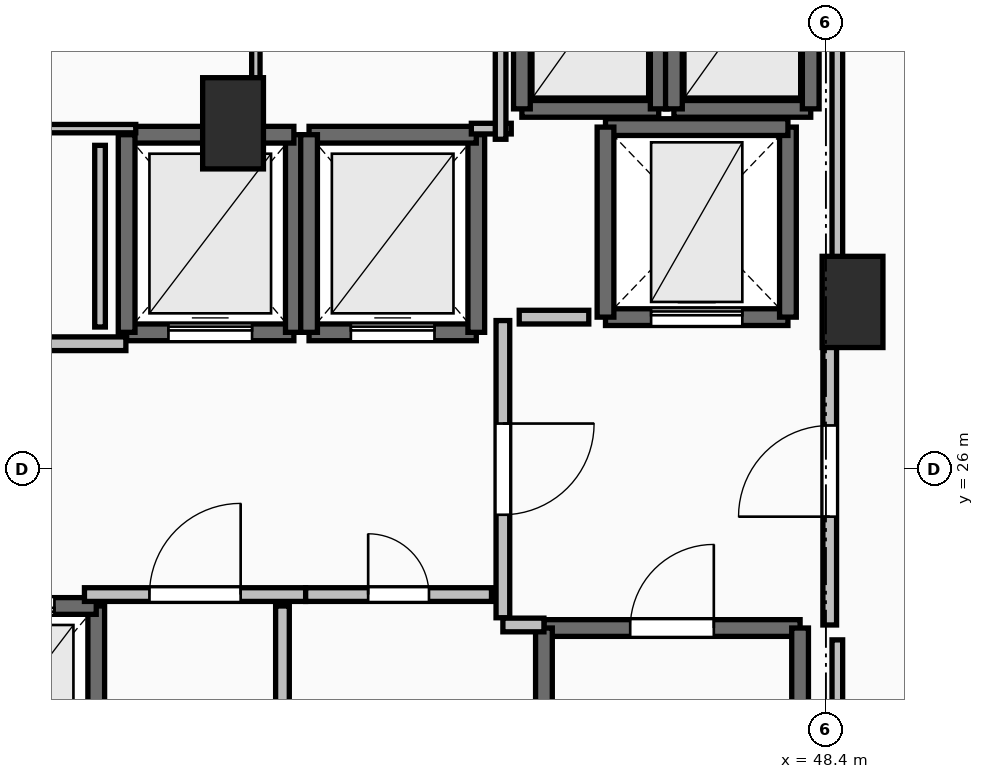
"""IFC4 building model, lengths in metres.
Left out: names, types, materials, properties, quantities, classifications, styles, units other than length and angle.
Written with IfcOpenShell. Run it as: python <this file> out.ifc"""

import sys

from ifc_helpers import new_model, si_unit, direction, frame, frame_2d, origin, origin_2d, place, context, subcontext, project, spatial, rectangle, extrude, element, fill, save


model = new_model("IFC4")
c1 = context("Model", 3, precision=1e-05, world=origin(), true_north=direction((0.0, 1.0)))
c2 = subcontext(c1, "Body", "Model", "MODEL_VIEW")
j1 = project(units=[si_unit("LENGTHUNIT", "METRE"), si_unit("PLANEANGLEUNIT", "RADIAN")], contexts=[c1])
p1 = place(None, origin())
s1 = spatial("IfcSite", under=j1, at=p1, CompositionType="ELEMENT")
p2 = place(p1, origin())
s2 = spatial("IfcBuilding", under=s1, at=p2, CompositionType="ELEMENT")
p3 = place(p2, frame((0.0, 0.0, 174.6)))
s3 = spatial("IfcBuildingStorey", under=s2, at=p3, CompositionType="ELEMENT", Elevation=174.6)
for number, where, z_axis, x_axis in (
    (1, (48.75, 28.2, 0.0), (0.0, 0.0, 1.0), (1.0, 0.0, 0.0)),
    (2, (40.6, 30.55, 0.0), (0.0, 0.0, 1.0), (1.0, 0.0, 0.0)),
):
    element("IfcColumn", number, at=place(p3, frame(where, z_axis=z_axis, x_axis=x_axis)), inside=s3, PredefinedType="PILASTER", context=c2, shape_type="SweptSolid", body=[
        extrude(rectangle(XDim=0.8, YDim=1.2, at=origin_2d()), origin(), (0.0, 0.0, 1.0), 4.5),
    ])
p4 = place(p3, frame((44.69, 23.91, 0.0), z_axis=(0.0, 0.0, 1.0), x_axis=(1.0, 0.0, 0.0)))
e3 = element("IfcWall", 3, at=p4, inside=s3, PredefinedType="SOLIDWALL", context=c2, shape_type="SweptSolid", body=[
    extrude(rectangle(XDim=3.37, YDim=0.22, at=frame_2d((1.685, 0.0))), origin(), (0.0, 0.0, 1.0), 4.24),
])
p5 = place(p4, frame((1.135, 0.0, 0.0)))
e4 = element("IfcOpeningElement", 4, at=p5, cuts=e3, PredefinedType="OPENING", context=c2, shape_type="SweptSolid", body=[
    extrude(rectangle(XDim=1.1, YDim=2.15, at=frame_2d((0.55, 1.075))), frame((0.0, 0.125, 0.0), z_axis=(0.0, -1.0, 0.0), x_axis=(1.0, 0.0, 0.0)), (0.0, 0.0, 1.0), 0.25),
])
for number, where, z_axis, x_axis in (
    (5, (48.06, 23.91, 0.0), (0.0, 0.0, 1.0), (0.0, -1.0, 0.0)),
    (6, (44.69, 16.49, 0.0), (0.0, 0.0, 1.0), (0.0, 1.0, 0.0)),
):
    element("IfcWall", number, at=place(p3, frame(where, z_axis=z_axis, x_axis=x_axis)), inside=s3, PredefinedType="SOLIDWALL", context=c2, shape_type="SweptSolid", body=[
        extrude(rectangle(XDim=7.42, YDim=0.22, at=frame_2d((3.71, 0.0))), origin(), (0.0, 0.0, 1.0), 4.24),
    ])
p6 = place(p3, frame((38.8, 21.6, 0.0), z_axis=(0.0, 0.0, 1.0), x_axis=(0.0, 1.0, 0.0)))
e7 = element("IfcWall", 7, at=p6, inside=s3, PredefinedType="SOLIDWALL", context=c2, shape_type="SweptSolid", body=[
    extrude(rectangle(XDim=2.6, YDim=0.22, at=frame_2d((1.3, 0.0))), origin(), (0.0, 0.0, 1.0), 4.24),
])
p7 = place(p3, frame((38.8, 24.2, 0.0), z_axis=(0.0, 0.0, 1.0), x_axis=(-1.0, 0.0, 0.0)))
e8 = element("IfcWall", 8, at=p7, inside=s3, PredefinedType="SOLIDWALL", context=c2, shape_type="SweptSolid", body=[
    extrude(rectangle(XDim=2.2, YDim=0.22, at=frame_2d((1.1, 0.0))), origin(), (0.0, 0.0, 1.0), 4.24),
])
p8 = place(p7, frame((0.55, 0.0, 0.0)))
e9 = element("IfcOpeningElement", 9, at=p8, cuts=e8, PredefinedType="OPENING", context=c2, shape_type="SweptSolid", body=[
    extrude(rectangle(XDim=1.1, YDim=2.2, at=frame_2d((0.55, 1.1))), frame((0.0, 0.125, 0.0), z_axis=(0.0, -1.0, 0.0), x_axis=(1.0, 0.0, 0.0)), (0.0, 0.0, 1.0), 0.25),
])
p9 = place(p3, frame((39.2, 27.8, 0.0), z_axis=(0.0, 0.0, 1.0), x_axis=(1.0, 0.0, 0.0)))
e10 = element("IfcWall", 10, at=p9, inside=s3, PredefinedType="SOLIDWALL", context=c2, shape_type="SweptSolid", body=[
    extrude(rectangle(XDim=2.2, YDim=0.22, at=frame_2d((1.1, 0.0))), origin(), (0.0, 0.0, 1.0), 4.24),
])
p10 = place(p9, frame((0.55, 0.0, 0.0)))
e11 = element("IfcOpeningElement", 11, at=p10, cuts=e10, PredefinedType="OPENING", context=c2, shape_type="SweptSolid", body=[
    extrude(rectangle(XDim=1.1, YDim=2.2, at=frame_2d((0.55, 1.1))), frame((0.0, 0.125, 0.0), z_axis=(0.0, -1.0, 0.0), x_axis=(1.0, 0.0, 0.0)), (0.0, 0.0, 1.0), 0.25),
])
p11 = place(p3, frame((41.4, 27.8, 0.0), z_axis=(0.0, 0.0, 1.0), x_axis=(0.0, 1.0, 0.0)))
e12 = element("IfcWall", 12, at=p11, inside=s3, PredefinedType="SOLIDWALL", context=c2, shape_type="SweptSolid", body=[
    extrude(rectangle(XDim=2.6, YDim=0.22, at=frame_2d((1.3, 0.0))), origin(), (0.0, 0.0, 1.0), 4.24),
])
p12 = place(p3, frame((41.4, 30.4, 0.0), z_axis=(0.0, 0.0, 1.0), x_axis=(-1.0, 0.0, 0.0)))
e13 = element("IfcWall", 13, at=p12, inside=s3, PredefinedType="SOLIDWALL", context=c2, shape_type="SweptSolid", body=[
    extrude(rectangle(XDim=2.2, YDim=0.22, at=frame_2d((1.1, 0.0))), origin(), (0.0, 0.0, 1.0), 4.24),
])
p13 = place(p3, frame((39.2, 30.4, 0.0), z_axis=(0.0, 0.0, 1.0), x_axis=(0.0, -1.0, 0.0)))
e14 = element("IfcWall", 14, at=p13, inside=s3, PredefinedType="SOLIDWALL", context=c2, shape_type="SweptSolid", body=[
    extrude(rectangle(XDim=2.6, YDim=0.22, at=frame_2d((1.3, 0.0))), origin(), (0.0, 0.0, 1.0), 4.24),
])
p14 = place(p3, frame((41.6, 27.8, 0.0), z_axis=(0.0, 0.0, 1.0), x_axis=(1.0, 0.0, 0.0)))
e15 = element("IfcWall", 15, at=p14, inside=s3, PredefinedType="SOLIDWALL", context=c2, shape_type="SweptSolid", body=[
    extrude(rectangle(XDim=2.2, YDim=0.22, at=frame_2d((1.1, 0.0))), origin(), (0.0, 0.0, 1.0), 4.24),
])
p15 = place(p14, frame((0.55, 0.0, 0.0)))
e16 = element("IfcOpeningElement", 16, at=p15, cuts=e15, PredefinedType="OPENING", context=c2, shape_type="SweptSolid", body=[
    extrude(rectangle(XDim=1.1, YDim=2.2, at=frame_2d((0.55, 1.1))), frame((0.0, 0.125, 0.0), z_axis=(0.0, -1.0, 0.0), x_axis=(1.0, 0.0, 0.0)), (0.0, 0.0, 1.0), 0.25),
])
p16 = place(p3, frame((43.8, 27.8, 0.0), z_axis=(0.0, 0.0, 1.0), x_axis=(0.0, 1.0, 0.0)))
e17 = element("IfcWall", 17, at=p16, inside=s3, PredefinedType="SOLIDWALL", context=c2, shape_type="SweptSolid", body=[
    extrude(rectangle(XDim=2.6, YDim=0.22, at=frame_2d((1.3, 0.0))), origin(), (0.0, 0.0, 1.0), 4.24),
])
p17 = place(p3, frame((43.8, 30.4, 0.0), z_axis=(0.0, 0.0, 1.0), x_axis=(-1.0, 0.0, 0.0)))
e18 = element("IfcWall", 18, at=p17, inside=s3, PredefinedType="SOLIDWALL", context=c2, shape_type="SweptSolid", body=[
    extrude(rectangle(XDim=2.2, YDim=0.22, at=frame_2d((1.1, 0.0))), origin(), (0.0, 0.0, 1.0), 4.24),
])
p18 = place(p3, frame((41.6, 30.4, 0.0), z_axis=(0.0, 0.0, 1.0), x_axis=(0.0, -1.0, 0.0)))
e19 = element("IfcWall", 19, at=p18, inside=s3, PredefinedType="SOLIDWALL", context=c2, shape_type="SweptSolid", body=[
    extrude(rectangle(XDim=2.6, YDim=0.22, at=frame_2d((1.3, 0.0))), origin(), (0.0, 0.0, 1.0), 4.24),
])
p19 = place(p3, frame((44.4, 30.74, 0.0), z_axis=(0.0, 0.0, 1.0), x_axis=(1.0, 0.0, 0.0)))
e20 = element("IfcWall", 20, at=p19, inside=s3, PredefinedType="SOLIDWALL", context=c2, shape_type="SweptSolid", body=[
    extrude(rectangle(XDim=1.8, YDim=0.22, at=frame_2d((0.9, 0.0))), origin(), (0.0, 0.0, 1.0), 4.24),
])
for number, where, z_axis, x_axis in (
    (21, (46.2, 30.74, 0.0), (0.0, 0.0, 1.0), (0.0, 1.0, 0.0)),
    (22, (44.4, 33.16, 0.0), (0.0, 0.0, 1.0), (0.0, -1.0, 0.0)),
):
    element("IfcWall", number, at=place(p3, frame(where, z_axis=z_axis, x_axis=x_axis)), inside=s3, PredefinedType="SOLIDWALL", context=c2, shape_type="SweptSolid", body=[
        extrude(rectangle(XDim=2.42, YDim=0.22, at=frame_2d((1.21, 0.0))), origin(), (0.0, 0.0, 1.0), 4.24),
    ])
p20 = place(p3, frame((46.4, 30.74, 0.0), z_axis=(0.0, 0.0, 1.0), x_axis=(1.0, 0.0, 0.0)))
e23 = element("IfcWall", 23, at=p20, inside=s3, PredefinedType="SOLIDWALL", context=c2, shape_type="SweptSolid", body=[
    extrude(rectangle(XDim=1.8, YDim=0.22, at=frame_2d((0.9, 0.0))), origin(), (0.0, 0.0, 1.0), 4.24),
])
for number, where, z_axis, x_axis in (
    (24, (48.2, 30.74, 0.0), (0.0, 0.0, 1.0), (0.0, 1.0, 0.0)),
    (25, (46.4, 33.16, 0.0), (0.0, 0.0, 1.0), (0.0, -1.0, 0.0)),
):
    element("IfcWall", number, at=place(p3, frame(where, z_axis=z_axis, x_axis=x_axis)), inside=s3, PredefinedType="SOLIDWALL", context=c2, shape_type="SweptSolid", body=[
        extrude(rectangle(XDim=2.42, YDim=0.22, at=frame_2d((1.21, 0.0))), origin(), (0.0, 0.0, 1.0), 4.24),
    ])
p21 = place(p3, frame((45.5, 28.0, 0.0), z_axis=(0.0, 0.0, 1.0), x_axis=(1.0, 0.0, 0.0)))
e26 = element("IfcWall", 26, at=p21, inside=s3, PredefinedType="SHEAR", context=c2, shape_type="SweptSolid", body=[
    extrude(rectangle(XDim=2.4, YDim=0.22, at=frame_2d((1.2, 0.0))), origin(), (0.0, 0.0, 1.0), 4.24),
])
p22 = place(p21, frame((0.6, 0.0, 0.0)))
e27 = element("IfcOpeningElement", 27, at=p22, cuts=e26, PredefinedType="OPENING", context=c2, shape_type="SweptSolid", body=[
    extrude(rectangle(XDim=1.2, YDim=2.2, at=frame_2d((0.6, 1.1))), frame((0.0, 0.125, 0.0), z_axis=(0.0, -1.0, 0.0), x_axis=(1.0, 0.0, 0.0)), (0.0, 0.0, 1.0), 0.25),
])
p23 = place(p3, frame((47.9, 28.0, 0.0), z_axis=(0.0, 0.0, 1.0), x_axis=(0.0, 1.0, 0.0)))
e28 = element("IfcWall", 28, at=p23, inside=s3, PredefinedType="SHEAR", context=c2, shape_type="SweptSolid", body=[
    extrude(rectangle(XDim=2.5, YDim=0.22, at=frame_2d((1.25, 0.0))), origin(), (0.0, 0.0, 1.0), 4.24),
])
p24 = place(p3, frame((47.9, 30.5, 0.0), z_axis=(0.0, 0.0, 1.0), x_axis=(-1.0, 0.0, 0.0)))
e29 = element("IfcWall", 29, at=p24, inside=s3, PredefinedType="SHEAR", context=c2, shape_type="SweptSolid", body=[
    extrude(rectangle(XDim=2.4, YDim=0.22, at=frame_2d((1.2, 0.0))), origin(), (0.0, 0.0, 1.0), 4.24),
])
p25 = place(p3, frame((45.5, 30.5, 0.0), z_axis=(0.0, 0.0, 1.0), x_axis=(0.0, -1.0, 0.0)))
e30 = element("IfcWall", 30, at=p25, inside=s3, PredefinedType="SHEAR", context=c2, shape_type="SweptSolid", body=[
    extrude(rectangle(XDim=2.5, YDim=0.22, at=frame_2d((1.25, 0.0))), origin(), (0.0, 0.0, 1.0), 4.24),
])
p26 = place(p3, frame((44.15, 27.955, 0.0), z_axis=(0.0, 0.0, 1.0), x_axis=(0.0, -1.0, 0.0)))
e31 = element("IfcWall", 31, at=p26, inside=s3, PredefinedType="PARTITIONING", context=c2, shape_type="SweptSolid", body=[
    extrude(rectangle(XDim=3.91, YDim=0.18, at=frame_2d((1.955, 0.0))), origin(), (0.0, 0.0, 1.0), 4.24),
])
p27 = place(p26, frame((1.355, 0.0, 0.0)))
e32 = element("IfcOpeningElement", 32, at=p27, cuts=e31, PredefinedType="OPENING", context=c2, shape_type="SweptSolid", body=[
    extrude(rectangle(XDim=1.2, YDim=2.15, at=frame_2d((0.6, 1.075))), frame((0.0, 0.105, 0.0), z_axis=(0.0, -1.0, 0.0), x_axis=(1.0, 0.0, 0.0)), (0.0, 0.0, 1.0), 0.21),
])
p28 = place(p3, frame((44.15, 23.95, 0.0), z_axis=(0.0, 0.0, 1.0), x_axis=(1.0, 0.0, 0.0)))
e33 = element("IfcWall", 33, at=p28, inside=s3, PredefinedType="PARTITIONING", context=c2, shape_type="SweptSolid", body=[
    extrude(rectangle(XDim=0.54, YDim=0.18, at=frame_2d((0.27, 0.0))), origin(), (0.0, 0.0, 1.0), 4.24),
])
p29 = place(p3, frame((48.45, 23.95, 0.0), z_axis=(0.0, 0.0, 1.0), x_axis=(0.0, 1.0, 0.0)))
e34 = element("IfcWall", 34, at=p29, inside=s3, PredefinedType="PARTITIONING", context=c2, shape_type="SweptSolid", body=[
    extrude(rectangle(XDim=4.05, YDim=0.18, at=frame_2d((2.025, 0.0))), origin(), (0.0, 0.0, 1.0), 4.24),
])
p30 = place(p29, frame((1.425, 0.0, 0.0)))
e35 = element("IfcOpeningElement", 35, at=p30, cuts=e34, PredefinedType="OPENING", context=c2, shape_type="SweptSolid", body=[
    extrude(rectangle(XDim=1.2, YDim=2.15, at=frame_2d((0.6, 1.075))), frame((0.0, 0.105, 0.0), z_axis=(0.0, -1.0, 0.0), x_axis=(1.0, 0.0, 0.0)), (0.0, 0.0, 1.0), 0.21),
])
p31 = place(p3, frame((38.645, 24.35, 0.0), z_axis=(0.0, 0.0, 1.0), x_axis=(1.0, 0.0, 0.0)))
e36 = element("IfcWall", 36, at=p31, inside=s3, PredefinedType="PARTITIONING", context=c2, shape_type="SweptSolid", body=[
    extrude(rectangle(XDim=2.91, YDim=0.18, at=frame_2d((1.455, 0.0))), origin(), (0.0, 0.0, 1.0), 4.24),
])
p32 = place(p31, frame((0.855, 0.0, 0.0)))
e37 = element("IfcOpeningElement", 37, at=p32, cuts=e36, PredefinedType="OPENING", context=c2, shape_type="SweptSolid", body=[
    extrude(rectangle(XDim=1.2, YDim=2.15, at=frame_2d((0.6, 1.075))), frame((0.0, 0.105, 0.0), z_axis=(0.0, -1.0, 0.0), x_axis=(1.0, 0.0, 0.0)), (0.0, 0.0, 1.0), 0.21),
])
p33 = place(p3, frame((41.555, 24.35, 0.0), z_axis=(0.0, 0.0, 1.0), x_axis=(1.0, 0.0, 0.0)))
e38 = element("IfcWall", 38, at=p33, inside=s3, PredefinedType="PARTITIONING", context=c2, shape_type="SweptSolid", body=[
    extrude(rectangle(XDim=2.445, YDim=0.18, at=frame_2d((1.223, 0.0))), origin(), (0.0, 0.0, 1.0), 4.24),
])
p34 = place(p33, frame((0.823, 0.0, 0.0)))
e39 = element("IfcOpeningElement", 39, at=p34, cuts=e38, PredefinedType="OPENING", context=c2, shape_type="SweptSolid", body=[
    extrude(rectangle(XDim=0.8, YDim=2.05, at=frame_2d((0.4, 1.025))), frame((0.0, 0.105, 0.0), z_axis=(0.0, -1.0, 0.0), x_axis=(1.0, 0.0, 0.0)), (0.0, 0.0, 1.0), 0.21),
])
p35 = place(p3, frame((39.19, 27.65, 0.0), z_axis=(0.0, 0.0, 1.0), x_axis=(-1.0, 0.0, 0.0)))
e40 = element("IfcWall", 40, at=p35, inside=s3, PredefinedType="PARTITIONING", context=c2, shape_type="SweptSolid", body=[
    extrude(rectangle(XDim=3.38, YDim=0.18, at=frame_2d((1.69, 0.0))), origin(), (0.0, 0.0, 1.0), 4.24),
])
p36 = place(p35, frame((1.265, 0.0, 0.0)))
e41 = element("IfcOpeningElement", 41, at=p36, cuts=e40, PredefinedType="OPENING", context=c2, shape_type="SweptSolid", body=[
    extrude(rectangle(XDim=0.85, YDim=2.1, at=frame_2d((0.425, 1.05))), frame((0.0, 0.105, 0.0), z_axis=(0.0, -1.0, 0.0), x_axis=(1.0, 0.0, 0.0)), (0.0, 0.0, 1.0), 0.21),
])
p37 = place(p3, frame((41.25, 16.32, 0.0), z_axis=(0.0, 0.0, 1.0), x_axis=(0.0, 1.0, 0.0)))
e42 = element("IfcWall", 42, at=p37, inside=s3, PredefinedType="PARTITIONING", context=c2, shape_type="SweptSolid", body=[
    extrude(rectangle(XDim=7.88, YDim=0.18, at=frame_2d((3.94, 0.0))), origin(), (0.0, 0.0, 1.0), 4.24),
])
p38 = place(p37, frame((3.54, 0.0, 0.0)))
e43 = element("IfcOpeningElement", 43, at=p38, cuts=e42, PredefinedType="OPENING", context=c2, shape_type="SweptSolid", body=[
    extrude(rectangle(XDim=0.8, YDim=2.05, at=frame_2d((0.4, 1.025))), frame((0.0, 0.105, 0.0), z_axis=(0.0, -1.0, 0.0), x_axis=(1.0, 0.0, 0.0)), (0.0, 0.0, 1.0), 0.21),
])
p39 = place(p3, frame((40.9, 30.34, 0.0), z_axis=(0.0, 0.0, 1.0), x_axis=(0.0, 1.0, 0.0)))
e44 = element("IfcWall", 44, at=p39, inside=s3, PredefinedType="PARTITIONING", context=c2, shape_type="SweptSolid", body=[
    extrude(rectangle(XDim=3.56, YDim=0.11, at=frame_2d((1.78, 0.0))), origin(), (0.0, 0.0, 1.0), 4.24),
])
p40 = place(p3, frame((36.11, 30.48, 0.0), z_axis=(0.0, 0.0, 1.0), x_axis=(1.0, 0.0, 0.0)))
e45 = element("IfcWall", 45, at=p40, inside=s3, PredefinedType="PARTITIONING", context=c2, shape_type="SweptSolid", body=[
    extrude(rectangle(XDim=3.21, YDim=0.11, at=frame_2d((1.605, 0.0))), origin(), (0.0, 0.0, 1.0), 3.432),
])
p41 = place(p3, frame((45.28, 28.0, 0.0), z_axis=(0.0, 0.0, 1.0), x_axis=(-1.0, 0.0, 0.0)))
e46 = element("IfcWall", 46, at=p41, inside=s3, PredefinedType="PARTITIONING", context=c2, shape_type="SweptSolid", body=[
    extrude(rectangle(XDim=0.915, YDim=0.18, at=frame_2d((0.458, 0.0))), origin(), (0.0, 0.0, 1.0), 4.24),
])
p42 = place(p3, frame((43.735, 30.48, 0.0), z_axis=(0.0, 0.0, 1.0), x_axis=(1.0, 0.0, 0.0)))
e47 = element("IfcWall", 47, at=p42, inside=s3, PredefinedType="PARTITIONING", context=c2, shape_type="SweptSolid", body=[
    extrude(rectangle(XDim=0.525, YDim=0.14, at=frame_2d((0.262, 0.0))), origin(), (0.0, 0.0, 1.0), 4.24),
])
p43 = place(p3, frame((44.12, 30.34, 0.0), z_axis=(0.0, 0.0, 1.0), x_axis=(0.0, 1.0, 0.0)))
e48 = element("IfcWall", 48, at=p43, inside=s3, PredefinedType="PARTITIONING", context=c2, shape_type="SweptSolid", body=[
    extrude(rectangle(XDim=2.66, YDim=0.14, at=frame_2d((1.33, 0.0))), origin(), (0.0, 0.0, 1.0), 4.24),
])
p44 = place(p3, frame((38.85, 27.87, 0.0), z_axis=(0.0, 0.0, 1.0), x_axis=(0.0, 1.0, 0.0)))
e49 = element("IfcWall", 49, at=p44, inside=s3, PredefinedType="PARTITIONING", context=c2, shape_type="SweptSolid", body=[
    extrude(rectangle(XDim=2.39, YDim=0.14, at=frame_2d((1.195, 0.0))), origin(), (0.0, 0.0, 1.0), 4.24),
])
p45 = place(p3, frame((48.55, 16.24, 0.0), z_axis=(0.0, 0.0, 1.0), x_axis=(0.0, 1.0, 0.0)))
e50 = element("IfcWall", 50, at=p45, inside=s3, PredefinedType="PARTITIONING", context=c2, shape_type="SweptSolid", body=[
    extrude(rectangle(XDim=7.514, YDim=0.14, at=frame_2d((3.757, 0.0))), origin(), (0.0, 0.0, 1.0), 3.432),
])
p46 = place(p3, frame((48.55, 28.196, 0.0), z_axis=(0.0, 0.0, 1.0), x_axis=(0.0, 1.0, 0.0)))
e51 = element("IfcWall", 51, at=p46, inside=s3, PredefinedType="PARTITIONING", context=c2, shape_type="SweptSolid", body=[
    extrude(rectangle(XDim=5.254, YDim=0.14, at=frame_2d((2.627, 0.0))), origin(), (0.0, 0.0, 1.0), 3.432),
])
p47 = place(p5, origin())
e52 = element("IfcDoor", 52, at=p47, inside=s3, OperationType="SINGLE_SWING_RIGHT", PredefinedType="DOOR", context=c2, shape_type="SweptSolid", body=[
    extrude(rectangle(XDim=1.1, YDim=2.15, at=frame_2d((0.55, 1.075))), frame((0.0, 0.025, 0.0), z_axis=(0.0, -1.0, 0.0), x_axis=(1.0, 0.0, 0.0)), (0.0, 0.0, 1.0), 0.05),
])
fill(e4, e52)
p48 = place(p8, origin())
e53 = element("IfcDoor", 53, at=p48, inside=s3, OperationType="SLIDING_TO_LEFT", PredefinedType="DOOR", context=c2, shape_type="SweptSolid", body=[
    extrude(rectangle(XDim=1.1, YDim=2.2, at=frame_2d((0.55, 1.1))), frame((0.0, 0.025, 0.0), z_axis=(0.0, -1.0, 0.0), x_axis=(1.0, 0.0, 0.0)), (0.0, 0.0, 1.0), 0.05),
])
fill(e9, e53)
p49 = place(p10, origin())
e54 = element("IfcDoor", 54, at=p49, inside=s3, OperationType="SLIDING_TO_LEFT", PredefinedType="DOOR", context=c2, shape_type="SweptSolid", body=[
    extrude(rectangle(XDim=1.1, YDim=2.2, at=frame_2d((0.55, 1.1))), frame((0.0, 0.025, 0.0), z_axis=(0.0, -1.0, 0.0), x_axis=(1.0, 0.0, 0.0)), (0.0, 0.0, 1.0), 0.05),
])
fill(e11, e54)
p50 = place(p15, origin())
e55 = element("IfcDoor", 55, at=p50, inside=s3, OperationType="SLIDING_TO_LEFT", PredefinedType="DOOR", context=c2, shape_type="SweptSolid", body=[
    extrude(rectangle(XDim=1.1, YDim=2.2, at=frame_2d((0.55, 1.1))), frame((0.0, 0.025, 0.0), z_axis=(0.0, -1.0, 0.0), x_axis=(1.0, 0.0, 0.0)), (0.0, 0.0, 1.0), 0.05),
])
fill(e16, e55)
p51 = place(p22, origin())
e56 = element("IfcDoor", 56, at=p51, inside=s3, OperationType="SLIDING_TO_LEFT", PredefinedType="DOOR", context=c2, shape_type="SweptSolid", body=[
    extrude(rectangle(XDim=1.2, YDim=2.2, at=frame_2d((0.6, 1.1))), frame((0.0, 0.025, 0.0), z_axis=(0.0, -1.0, 0.0), x_axis=(1.0, 0.0, 0.0)), (0.0, 0.0, 1.0), 0.05),
])
fill(e27, e56)
p52 = place(p27, origin())
e57 = element("IfcDoor", 57, at=p52, inside=s3, OperationType="SINGLE_SWING_LEFT", PredefinedType="DOOR", context=c2, shape_type="SweptSolid", body=[
    extrude(rectangle(XDim=1.2, YDim=2.15, at=frame_2d((0.6, 1.075))), frame((0.0, 0.025, 0.0), z_axis=(0.0, -1.0, 0.0), x_axis=(1.0, 0.0, 0.0)), (0.0, 0.0, 1.0), 0.05),
])
fill(e32, e57)
p53 = place(p30, origin())
e58 = element("IfcDoor", 58, at=p53, inside=s3, OperationType="SINGLE_SWING_LEFT", PredefinedType="DOOR", context=c2, shape_type="SweptSolid", body=[
    extrude(rectangle(XDim=1.2, YDim=2.15, at=frame_2d((0.6, 1.075))), frame((0.0, 0.025, 0.0), z_axis=(0.0, -1.0, 0.0), x_axis=(1.0, 0.0, 0.0)), (0.0, 0.0, 1.0), 0.05),
])
fill(e35, e58)
p54 = place(p32, origin())
e59 = element("IfcDoor", 59, at=p54, inside=s3, OperationType="SINGLE_SWING_RIGHT", PredefinedType="DOOR", context=c2, shape_type="SweptSolid", body=[
    extrude(rectangle(XDim=1.2, YDim=2.15, at=frame_2d((0.6, 1.075))), frame((0.0, 0.025, 0.0), z_axis=(0.0, -1.0, 0.0), x_axis=(1.0, 0.0, 0.0)), (0.0, 0.0, 1.0), 0.05),
])
fill(e37, e59)
p55 = place(p34, origin())
e60 = element("IfcDoor", 60, at=p55, inside=s3, OperationType="SINGLE_SWING_LEFT", PredefinedType="DOOR", context=c2, shape_type="SweptSolid", body=[
    extrude(rectangle(XDim=0.8, YDim=2.05, at=frame_2d((0.4, 1.025))), frame((0.0, 0.025, 0.0), z_axis=(0.0, -1.0, 0.0), x_axis=(1.0, 0.0, 0.0)), (0.0, 0.0, 1.0), 0.05),
])
fill(e39, e60)
save(model, sys.argv[1])
